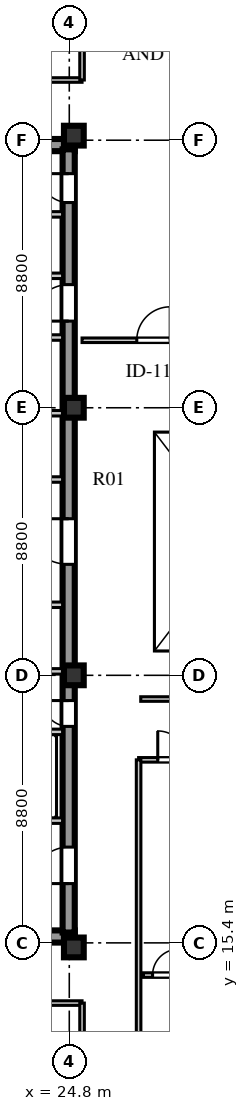
"""IFC4 building model, lengths in metres.
Left out: names, types, materials, properties, quantities, classifications, styles, units other than length and angle.
Written with IfcOpenShell. Run it as: python <this file> out.ifc"""

import sys

from ifc_helpers import new_model, si_unit, direction, frame, frame_2d, origin, origin_2d, place, context, subcontext, project, spatial, rectangle, extrude, element, fill, save


model = new_model("IFC4")
c1 = context("Model", 3, precision=1e-05, world=origin(), true_north=direction((0.0, 1.0)))
c2 = subcontext(c1, "Body", "Model", "MODEL_VIEW")
j1 = project(units=[si_unit("LENGTHUNIT", "METRE"), si_unit("PLANEANGLEUNIT", "RADIAN")], contexts=[c1])
p1 = place(None, origin())
s1 = spatial("IfcSite", under=j1, at=p1, CompositionType="ELEMENT")
p2 = place(p1, origin())
s2 = spatial("IfcBuilding", under=s1, at=p2, CompositionType="ELEMENT")
p3 = place(p2, frame((0.0, 0.0, 245.3)))
s3 = spatial("IfcBuildingStorey", under=s2, at=p3, CompositionType="ELEMENT", Elevation=245.3)
for number, where, z_axis, x_axis in (
    (1, (15.5, 15.61, 0.0), (0.0, 0.0, 1.0), (1.0, 0.0, 0.0)),
    (2, (15.5, 41.64, 0.0), (0.0, 0.0, 1.0), (1.0, 0.0, 0.0)),
):
    element("IfcWall", number, at=place(p3, frame(where, z_axis=z_axis, x_axis=x_axis)), inside=s3, PredefinedType="SHEAR", context=c2, shape_type="SweptSolid", body=[
        extrude(rectangle(XDim=9.48, YDim=0.4, at=frame_2d((4.74, 0.0))), origin(), (0.0, 0.0, 1.0), 3.66),
    ])
p4 = place(p3, frame((24.78, 15.74, 0.0), z_axis=(0.0, 0.0, 1.0), x_axis=(0.0, 1.0, 0.0)))
e3 = element("IfcWall", 3, at=p4, inside=s3, PredefinedType="SHEAR", context=c2, shape_type="SweptSolid", body=[
    extrude(rectangle(XDim=25.76, YDim=0.4, at=frame_2d((12.88, 0.0))), origin(), (0.0, 0.0, 1.0), 3.66),
])
p5 = place(p4, frame((1.61, 0.0, 0.0)))
e4 = element("IfcOpeningElement", 4, at=p5, cuts=e3, PredefinedType="OPENING", context=c2, shape_type="SweptSolid", body=[
    extrude(rectangle(XDim=1.2, YDim=2.1, at=frame_2d((0.6, 1.05))), frame((0.0, 0.21, 0.0), z_axis=(0.0, -1.0, 0.0), x_axis=(1.0, 0.0, 0.0)), (0.0, 0.0, 1.0), 0.42),
])
p6 = place(p4, frame((6.78, 0.0, 0.0)))
e5 = element("IfcOpeningElement", 5, at=p6, cuts=e3, PredefinedType="OPENING", context=c2, shape_type="SweptSolid", body=[
    extrude(rectangle(XDim=0.85, YDim=2.06, at=frame_2d((0.425, 1.03))), frame((0.0, 0.21, 0.0), z_axis=(0.0, -1.0, 0.0), x_axis=(1.0, 0.0, 0.0)), (0.0, 0.0, 1.0), 0.42),
])
p7 = place(p4, frame((12.11, 0.0, 0.0)))
e6 = element("IfcOpeningElement", 6, at=p7, cuts=e3, PredefinedType="OPENING", context=c2, shape_type="SweptSolid", body=[
    extrude(rectangle(XDim=1.5, YDim=2.12, at=frame_2d((0.75, 1.06))), frame((0.0, 0.21, 0.0), z_axis=(0.0, -1.0, 0.0), x_axis=(1.0, 0.0, 0.0)), (0.0, 0.0, 1.0), 0.42),
])
p8 = place(p4, frame((20.11, 0.0, 0.0)))
e7 = element("IfcOpeningElement", 7, at=p8, cuts=e3, PredefinedType="OPENING", context=c2, shape_type="SweptSolid", body=[
    extrude(rectangle(XDim=1.2, YDim=2.12, at=frame_2d((0.6, 1.06))), frame((0.0, 0.21, 0.0), z_axis=(0.0, -1.0, 0.0), x_axis=(1.0, 0.0, 0.0)), (0.0, 0.0, 1.0), 0.42),
])
p9 = place(p4, frame((24.01, 0.0, 0.0)))
e8 = element("IfcOpeningElement", 8, at=p9, cuts=e3, PredefinedType="OPENING", context=c2, shape_type="SweptSolid", body=[
    extrude(rectangle(XDim=0.95, YDim=2.1, at=frame_2d((0.475, 1.05))), frame((0.0, 0.21, 0.0), z_axis=(0.0, -1.0, 0.0), x_axis=(1.0, 0.0, 0.0)), (0.0, 0.0, 1.0), 0.42),
])
for number, where, z_axis, x_axis in (
    (9, (24.95, 15.25, 0.0), (0.0, 0.0, 1.0), (1.0, 0.0, 0.0)),
    (10, (24.95, 24.2, 0.0), (0.0, 0.0, 1.0), (1.0, 0.0, 0.0)),
    (11, (24.95, 33.0, 0.0), (0.0, 0.0, 1.0), (1.0, 0.0, 0.0)),
    (12, (24.95, 41.95, 0.0), (0.0, 0.0, 1.0), (1.0, 0.0, 0.0)),
):
    element("IfcColumn", number, at=place(p3, frame(where, z_axis=z_axis, x_axis=x_axis)), inside=s3, PredefinedType="COLUMN", context=c2, shape_type="SweptSolid", body=[
        extrude(rectangle(XDim=0.65, YDim=0.65, at=origin_2d()), origin(), (0.0, 0.0, 1.0), 3.66),
    ])
p10 = place(p3, frame((19.64, 19.42, 0.0), z_axis=(0.0, 0.0, 1.0), x_axis=(1.0, 0.0, 0.0)))
e13 = element("IfcWall", 13, at=p10, inside=s3, PredefinedType="SOLIDWALL", context=c2, shape_type="SweptSolid", body=[
    extrude(rectangle(XDim=4.94, YDim=0.18, at=frame_2d((2.47, 0.0))), origin(), (0.0, 0.0, 1.0), 3.66),
])
p11 = place(p10, frame((0.72, 0.0, 0.0)))
e14 = element("IfcOpeningElement", 14, at=p11, cuts=e13, PredefinedType="OPENING", context=c2, shape_type="SweptSolid", body=[
    extrude(rectangle(XDim=1.1, YDim=2.1, at=frame_2d((0.55, 1.05))), frame((0.0, 0.1, 0.0), z_axis=(0.0, -1.0, 0.0), x_axis=(1.0, 0.0, 0.0)), (0.0, 0.0, 1.0), 0.2),
])
p12 = place(p10, frame((3.02, 0.0, 0.0)))
e15 = element("IfcOpeningElement", 15, at=p12, cuts=e13, PredefinedType="OPENING", context=c2, shape_type="SweptSolid", body=[
    extrude(rectangle(XDim=1.1, YDim=2.1, at=frame_2d((0.55, 1.05))), frame((0.0, 0.1, 0.0), z_axis=(0.0, -1.0, 0.0), x_axis=(1.0, 0.0, 0.0)), (0.0, 0.0, 1.0), 0.2),
])
p13 = place(p3, frame((19.64, 22.34, 0.0), z_axis=(0.0, 0.0, 1.0), x_axis=(1.0, 0.0, 0.0)))
e16 = element("IfcWall", 16, at=p13, inside=s3, PredefinedType="SOLIDWALL", context=c2, shape_type="SweptSolid", body=[
    extrude(rectangle(XDim=4.94, YDim=0.18, at=frame_2d((2.47, 0.0))), origin(), (0.0, 0.0, 1.0), 3.66),
])
p14 = place(p3, frame((15.9, 26.52, 0.0), z_axis=(0.0, 0.0, 1.0), x_axis=(1.0, 0.0, 0.0)))
e17 = element("IfcWall", 17, at=p14, inside=s3, PredefinedType="SOLIDWALL", context=c2, shape_type="SweptSolid", body=[
    extrude(rectangle(XDim=8.68, YDim=0.18, at=frame_2d((4.34, 0.0))), origin(), (0.0, 0.0, 1.0), 3.66),
])
p15 = place(p14, frame((3.3, 0.0, 0.0)))
e18 = element("IfcOpeningElement", 18, at=p15, cuts=e17, PredefinedType="OPENING", context=c2, shape_type="SweptSolid", body=[
    extrude(rectangle(XDim=0.95, YDim=2.1, at=frame_2d((0.475, 1.05))), frame((0.0, 0.1, 0.0), z_axis=(0.0, -1.0, 0.0), x_axis=(1.0, 0.0, 0.0)), (0.0, 0.0, 1.0), 0.2),
])
p16 = place(p3, frame((15.9, 24.33, 0.0), z_axis=(0.0, 0.0, 1.0), x_axis=(1.0, 0.0, 0.0)))
e19 = element("IfcWall", 19, at=p16, inside=s3, PredefinedType="SOLIDWALL", context=c2, shape_type="SweptSolid", body=[
    extrude(rectangle(XDim=8.68, YDim=0.18, at=frame_2d((4.34, 0.0))), origin(), (0.0, 0.0, 1.0), 3.06),
])
p17 = place(p3, frame((15.9, 30.64, 0.0), z_axis=(0.0, 0.0, 1.0), x_axis=(1.0, 0.0, 0.0)))
e20 = element("IfcWall", 20, at=p17, inside=s3, PredefinedType="SOLIDWALL", context=c2, shape_type="SweptSolid", body=[
    extrude(rectangle(XDim=8.68, YDim=0.18, at=frame_2d((4.34, 0.0))), origin(), (0.0, 0.0, 1.0), 3.66),
])
p18 = place(p17, frame((3.7, 0.0, 0.0)))
e21 = element("IfcOpeningElement", 21, at=p18, cuts=e20, PredefinedType="OPENING", context=c2, shape_type="SweptSolid", body=[
    extrude(rectangle(XDim=0.95, YDim=2.1, at=frame_2d((0.475, 1.05))), frame((0.0, 0.1, 0.0), z_axis=(0.0, -1.0, 0.0), x_axis=(1.0, 0.0, 0.0)), (0.0, 0.0, 1.0), 0.2),
])
p19 = place(p3, frame((15.9, 32.82, 0.0), z_axis=(0.0, 0.0, 1.0), x_axis=(1.0, 0.0, 0.0)))
e22 = element("IfcWall", 22, at=p19, inside=s3, PredefinedType="SOLIDWALL", context=c2, shape_type="SweptSolid", body=[
    extrude(rectangle(XDim=8.68, YDim=0.18, at=frame_2d((4.34, 0.0))), origin(), (0.0, 0.0, 1.0), 3.06),
])
p20 = place(p3, frame((22.02, 35.31, 0.0), z_axis=(0.0, 0.0, 1.0), x_axis=(1.0, 0.0, 0.0)))
e23 = element("IfcWall", 23, at=p20, inside=s3, PredefinedType="SOLIDWALL", context=c2, shape_type="SweptSolid", body=[
    extrude(rectangle(XDim=2.56, YDim=0.18, at=frame_2d((1.28, 0.0))), origin(), (0.0, 0.0, 1.0), 3.66),
])
p21 = place(p20, frame((0.55, 0.0, 0.0)))
e24 = element("IfcOpeningElement", 24, at=p21, cuts=e23, PredefinedType="OPENING", context=c2, shape_type="SweptSolid", body=[
    extrude(rectangle(XDim=1.0, YDim=2.1, at=frame_2d((0.5, 1.05))), frame((0.0, 0.1, 0.0), z_axis=(0.0, -1.0, 0.0), x_axis=(1.0, 0.0, 0.0)), (0.0, 0.0, 1.0), 0.2),
])
p22 = place(p3, frame((19.64, 37.34, 0.0), z_axis=(0.0, 0.0, 1.0), x_axis=(1.0, 0.0, 0.0)))
e25 = element("IfcWall", 25, at=p22, inside=s3, PredefinedType="SOLIDWALL", context=c2, shape_type="SweptSolid", body=[
    extrude(rectangle(XDim=4.94, YDim=0.18, at=frame_2d((2.47, 0.0))), origin(), (0.0, 0.0, 1.0), 3.66),
])
p23 = place(p22, frame((0.45, 0.0, 0.0)))
e26 = element("IfcOpeningElement", 26, at=p23, cuts=e25, PredefinedType="OPENING", context=c2, shape_type="SweptSolid", body=[
    extrude(rectangle(XDim=1.0, YDim=2.1, at=frame_2d((0.5, 1.05))), frame((0.0, 0.1, 0.0), z_axis=(0.0, -1.0, 0.0), x_axis=(1.0, 0.0, 0.0)), (0.0, 0.0, 1.0), 0.2),
])
p24 = place(p22, frame((2.5, 0.0, 0.0)))
e27 = element("IfcOpeningElement", 27, at=p24, cuts=e25, PredefinedType="OPENING", context=c2, shape_type="SweptSolid", body=[
    extrude(rectangle(XDim=1.0, YDim=2.1, at=frame_2d((0.5, 1.05))), frame((0.0, 0.1, 0.0), z_axis=(0.0, -1.0, 0.0), x_axis=(1.0, 0.0, 0.0)), (0.0, 0.0, 1.0), 0.2),
])
p25 = place(p3, frame((19.64, 39.36, 0.0), z_axis=(0.0, 0.0, 1.0), x_axis=(1.0, 0.0, 0.0)))
e28 = element("IfcWall", 28, at=p25, inside=s3, PredefinedType="SOLIDWALL", context=c2, shape_type="SweptSolid", body=[
    extrude(rectangle(XDim=4.94, YDim=0.18, at=frame_2d((2.47, 0.0))), origin(), (0.0, 0.0, 1.0), 3.66),
])
p26 = place(p3, frame((27.08, 21.42, 0.0), z_axis=(0.0, 0.0, 1.0), x_axis=(1.0, 0.0, 0.0)))
e29 = element("IfcWall", 29, at=p26, inside=s3, PredefinedType="PARTITIONING", context=c2, shape_type="SweptSolid", body=[
    extrude(rectangle(XDim=12.07, YDim=0.15, at=frame_2d((6.035, 0.0))), origin(), (0.0, 0.0, 1.0), 3.31),
])
p27 = place(p26, frame((0.63, 0.0, 0.0)))
e30 = element("IfcOpeningElement", 30, at=p27, cuts=e29, PredefinedType="OPENING", context=c2, shape_type="SweptSolid", body=[
    extrude(rectangle(XDim=0.95, YDim=2.1, at=frame_2d((0.475, 1.05))), frame((0.0, 0.085, 0.0), z_axis=(0.0, -1.0, 0.0), x_axis=(1.0, 0.0, 0.0)), (0.0, 0.0, 1.0), 0.17),
])
p28 = place(p3, frame((27.08, 7.88, 0.0), z_axis=(0.0, 0.0, 1.0), x_axis=(0.0, 1.0, 0.0)))
e31 = element("IfcWall", 31, at=p28, inside=s3, PredefinedType="PARTITIONING", context=c2, shape_type="SweptSolid", body=[
    extrude(rectangle(XDim=13.54, YDim=0.15, at=frame_2d((6.77, 0.0))), origin(), (0.0, 0.0, 1.0), 3.66),
])
p29 = place(p3, frame((27.15, 23.42, 0.0), z_axis=(0.0, 0.0, 1.0), x_axis=(1.0, 0.0, 0.0)))
e32 = element("IfcWall", 32, at=p29, inside=s3, PredefinedType="PARTITIONING", context=c2, shape_type="SweptSolid", body=[
    extrude(rectangle(XDim=6.0, YDim=0.15, at=frame_2d((3.0, 0.0))), origin(), (0.0, 0.0, 1.0), 3.66),
])
p30 = place(p3, frame((25.22, 35.22, 0.0), z_axis=(0.0, 0.0, 1.0), x_axis=(1.0, 0.0, 0.0)))
e33 = element("IfcWall", 33, at=p30, inside=s3, PredefinedType="PARTITIONING", context=c2, shape_type="SweptSolid", body=[
    extrude(rectangle(XDim=9.5, YDim=0.15, at=frame_2d((4.75, 0.0))), origin(), (0.0, 0.0, 1.0), 3.66),
])
p31 = place(p30, frame((1.8, 0.0, 0.0)))
e34 = element("IfcOpeningElement", 34, at=p31, cuts=e33, PredefinedType="OPENING", context=c2, shape_type="SweptSolid", body=[
    extrude(rectangle(XDim=1.1, YDim=2.08, at=frame_2d((0.55, 1.04))), frame((0.0, 0.085, 0.0), z_axis=(0.0, -1.0, 0.0), x_axis=(1.0, 0.0, 0.0)), (0.0, 0.0, 1.0), 0.17),
])
p32 = place(p3, frame((13.4, 13.42, 0.0), z_axis=(0.0, 0.0, 1.0), x_axis=(1.0, 0.0, 0.0)))
e35 = element("IfcWall", 35, at=p32, inside=s3, PredefinedType="PARTITIONING", context=c2, shape_type="SweptSolid", body=[
    extrude(rectangle(XDim=11.82, YDim=0.15, at=frame_2d((5.91, 0.0))), origin(), (0.0, 0.0, 1.0), 3.66),
])
p33 = place(p32, frame((3.2, 0.0, 0.0)))
e36 = element("IfcOpeningElement", 36, at=p33, cuts=e35, PredefinedType="OPENING", context=c2, shape_type="SweptSolid", body=[
    extrude(rectangle(XDim=0.95, YDim=2.08, at=frame_2d((0.475, 1.04))), frame((0.0, 0.085, 0.0), z_axis=(0.0, -1.0, 0.0), x_axis=(1.0, 0.0, 0.0)), (0.0, 0.0, 1.0), 0.17),
])
p34 = place(p3, frame((25.22, 7.88, 0.0), z_axis=(0.0, 0.0, 1.0), x_axis=(0.0, 1.0, 0.0)))
e37 = element("IfcWall", 37, at=p34, inside=s3, PredefinedType="PARTITIONING", context=c2, shape_type="SweptSolid", body=[
    extrude(rectangle(XDim=5.54, YDim=0.15, at=frame_2d((2.77, 0.0))), origin(), (0.0, 0.0, 1.0), 3.21),
])
p35 = place(p3, frame((13.4, 43.78, 0.0), z_axis=(0.0, 0.0, 1.0), x_axis=(1.0, 0.0, 0.0)))
e38 = element("IfcWall", 38, at=p35, inside=s3, PredefinedType="PARTITIONING", context=c2, shape_type="SweptSolid", body=[
    extrude(rectangle(XDim=11.82, YDim=0.15, at=frame_2d((5.91, 0.0))), origin(), (0.0, 0.0, 1.0), 3.66),
])
p36 = place(p35, frame((3.2, 0.0, 0.0)))
e39 = element("IfcOpeningElement", 39, at=p36, cuts=e38, PredefinedType="OPENING", context=c2, shape_type="SweptSolid", body=[
    extrude(rectangle(XDim=0.95, YDim=2.08, at=frame_2d((0.475, 1.04))), frame((0.0, 0.085, 0.0), z_axis=(0.0, -1.0, 0.0), x_axis=(1.0, 0.0, 0.0)), (0.0, 0.0, 1.0), 0.17),
])
p37 = place(p3, frame((25.22, 43.78, 0.0), z_axis=(0.0, 0.0, 1.0), x_axis=(0.0, 1.0, 0.0)))
e40 = element("IfcWall", 40, at=p37, inside=s3, PredefinedType="PARTITIONING", context=c2, shape_type="SweptSolid", body=[
    extrude(rectangle(XDim=5.54, YDim=0.15, at=frame_2d((2.77, 0.0))), origin(), (0.0, 0.0, 1.0), 3.21),
])
p38 = place(p3, frame((27.24, 14.341, 0.0), z_axis=(0.0, 0.0, 1.0), x_axis=(1.0, 0.0, 0.0)))
e41 = element("IfcWall", 41, at=p38, inside=s3, PredefinedType="PARTITIONING", context=c2, shape_type="SweptSolid", body=[
    extrude(rectangle(XDim=11.83, YDim=0.15, at=frame_2d((5.915, 0.0))), origin(), (0.0, 0.0, 1.0), 3.66),
])
p39 = place(p38, frame((0.3, 0.0, 0.0)))
e42 = element("IfcOpeningElement", 42, at=p39, cuts=e41, PredefinedType="OPENING", context=c2, shape_type="SweptSolid", body=[
    extrude(rectangle(XDim=0.85, YDim=2.08, at=frame_2d((0.425, 1.04))), frame((0.0, 0.085, 0.0), z_axis=(0.0, -1.0, 0.0), x_axis=(1.0, 0.0, 0.0)), (0.0, 0.0, 1.0), 0.17),
])
p40 = place(p38, frame((3.135, 0.0, 0.0)))
e43 = element("IfcOpeningElement", 43, at=p40, cuts=e41, PredefinedType="OPENING", context=c2, shape_type="SweptSolid", body=[
    extrude(rectangle(XDim=0.85, YDim=2.08, at=frame_2d((0.425, 1.04))), frame((0.0, 0.085, 0.0), z_axis=(0.0, -1.0, 0.0), x_axis=(1.0, 0.0, 0.0)), (0.0, 0.0, 1.0), 0.17),
])
p41 = place(p5, frame((1.2, 0.0, 0.0), z_axis=(0.0, 0.0, 1.0), x_axis=(-1.0, 0.0, 0.0)))
e44 = element("IfcDoor", 44, at=p41, inside=s3, OperationType="SINGLE_SWING_RIGHT", PredefinedType="DOOR", context=c2, shape_type="SweptSolid", body=[
    extrude(rectangle(XDim=1.2, YDim=2.1, at=frame_2d((0.6, 1.05))), frame((0.0, 0.025, 0.0), z_axis=(0.0, -1.0, 0.0), x_axis=(1.0, 0.0, 0.0)), (0.0, 0.0, 1.0), 0.05),
])
fill(e4, e44)
p42 = place(p6, frame((0.85, 0.0, 0.0), z_axis=(0.0, 0.0, 1.0), x_axis=(-1.0, 0.0, 0.0)))
e45 = element("IfcDoor", 45, at=p42, inside=s3, OperationType="SINGLE_SWING_LEFT", PredefinedType="DOOR", context=c2, shape_type="SweptSolid", body=[
    extrude(rectangle(XDim=0.85, YDim=2.06, at=frame_2d((0.425, 1.03))), frame((0.0, 0.025, 0.0), z_axis=(0.0, -1.0, 0.0), x_axis=(1.0, 0.0, 0.0)), (0.0, 0.0, 1.0), 0.05),
])
fill(e5, e45)
p43 = place(p7, frame((1.5, 0.0, 0.0), z_axis=(0.0, 0.0, 1.0), x_axis=(-1.0, 0.0, 0.0)))
e46 = element("IfcDoor", 46, at=p43, inside=s3, OperationType="SINGLE_SWING_LEFT", PredefinedType="DOOR", context=c2, shape_type="SweptSolid", body=[
    extrude(rectangle(XDim=1.5, YDim=2.12, at=frame_2d((0.75, 1.06))), frame((0.0, 0.025, 0.0), z_axis=(0.0, -1.0, 0.0), x_axis=(1.0, 0.0, 0.0)), (0.0, 0.0, 1.0), 0.05),
])
fill(e6, e46)
p44 = place(p8, frame((1.2, 0.0, 0.0), z_axis=(0.0, 0.0, 1.0), x_axis=(-1.0, 0.0, 0.0)))
e47 = element("IfcDoor", 47, at=p44, inside=s3, OperationType="SINGLE_SWING_RIGHT", PredefinedType="DOOR", context=c2, shape_type="SweptSolid", body=[
    extrude(rectangle(XDim=1.2, YDim=2.12, at=frame_2d((0.6, 1.06))), frame((0.0, 0.025, 0.0), z_axis=(0.0, -1.0, 0.0), x_axis=(1.0, 0.0, 0.0)), (0.0, 0.0, 1.0), 0.05),
])
fill(e7, e47)
p45 = place(p9, frame((0.95, 0.0, 0.0), z_axis=(0.0, 0.0, 1.0), x_axis=(-1.0, 0.0, 0.0)))
e48 = element("IfcDoor", 48, at=p45, inside=s3, OperationType="SINGLE_SWING_LEFT", PredefinedType="DOOR", context=c2, shape_type="SweptSolid", body=[
    extrude(rectangle(XDim=0.95, YDim=2.1, at=frame_2d((0.475, 1.05))), frame((0.0, 0.025, 0.0), z_axis=(0.0, -1.0, 0.0), x_axis=(1.0, 0.0, 0.0)), (0.0, 0.0, 1.0), 0.05),
])
fill(e8, e48)
p46 = place(p39, frame((0.85, 0.0, 0.0), z_axis=(0.0, 0.0, 1.0), x_axis=(-1.0, 0.0, 0.0)))
e49 = element("IfcDoor", 49, at=p46, inside=s3, OperationType="SINGLE_SWING_LEFT", PredefinedType="DOOR", context=c2, shape_type="SweptSolid", body=[
    extrude(rectangle(XDim=0.85, YDim=2.08, at=frame_2d((0.425, 1.04))), frame((0.0, 0.025, 0.0), z_axis=(0.0, -1.0, 0.0), x_axis=(1.0, 0.0, 0.0)), (0.0, 0.0, 1.0), 0.05),
])
fill(e42, e49)
p47 = place(p27, frame((0.95, 0.0, 0.0), z_axis=(0.0, 0.0, 1.0), x_axis=(-1.0, 0.0, 0.0)))
e50 = element("IfcDoor", 50, at=p47, inside=s3, OperationType="SINGLE_SWING_RIGHT", PredefinedType="DOOR", context=c2, shape_type="SweptSolid", body=[
    extrude(rectangle(XDim=0.95, YDim=2.1, at=frame_2d((0.475, 1.05))), frame((0.0, 0.025, 0.0), z_axis=(0.0, -1.0, 0.0), x_axis=(1.0, 0.0, 0.0)), (0.0, 0.0, 1.0), 0.05),
])
fill(e30, e50)
p48 = place(p31, origin())
e51 = element("IfcDoor", 51, at=p48, inside=s3, OperationType="SINGLE_SWING_RIGHT", PredefinedType="DOOR", context=c2, shape_type="SweptSolid", body=[
    extrude(rectangle(XDim=1.1, YDim=2.08, at=frame_2d((0.55, 1.04))), frame((0.0, 0.025, 0.0), z_axis=(0.0, -1.0, 0.0), x_axis=(1.0, 0.0, 0.0)), (0.0, 0.0, 1.0), 0.05),
])
fill(e34, e51)
save(model, sys.argv[1])
